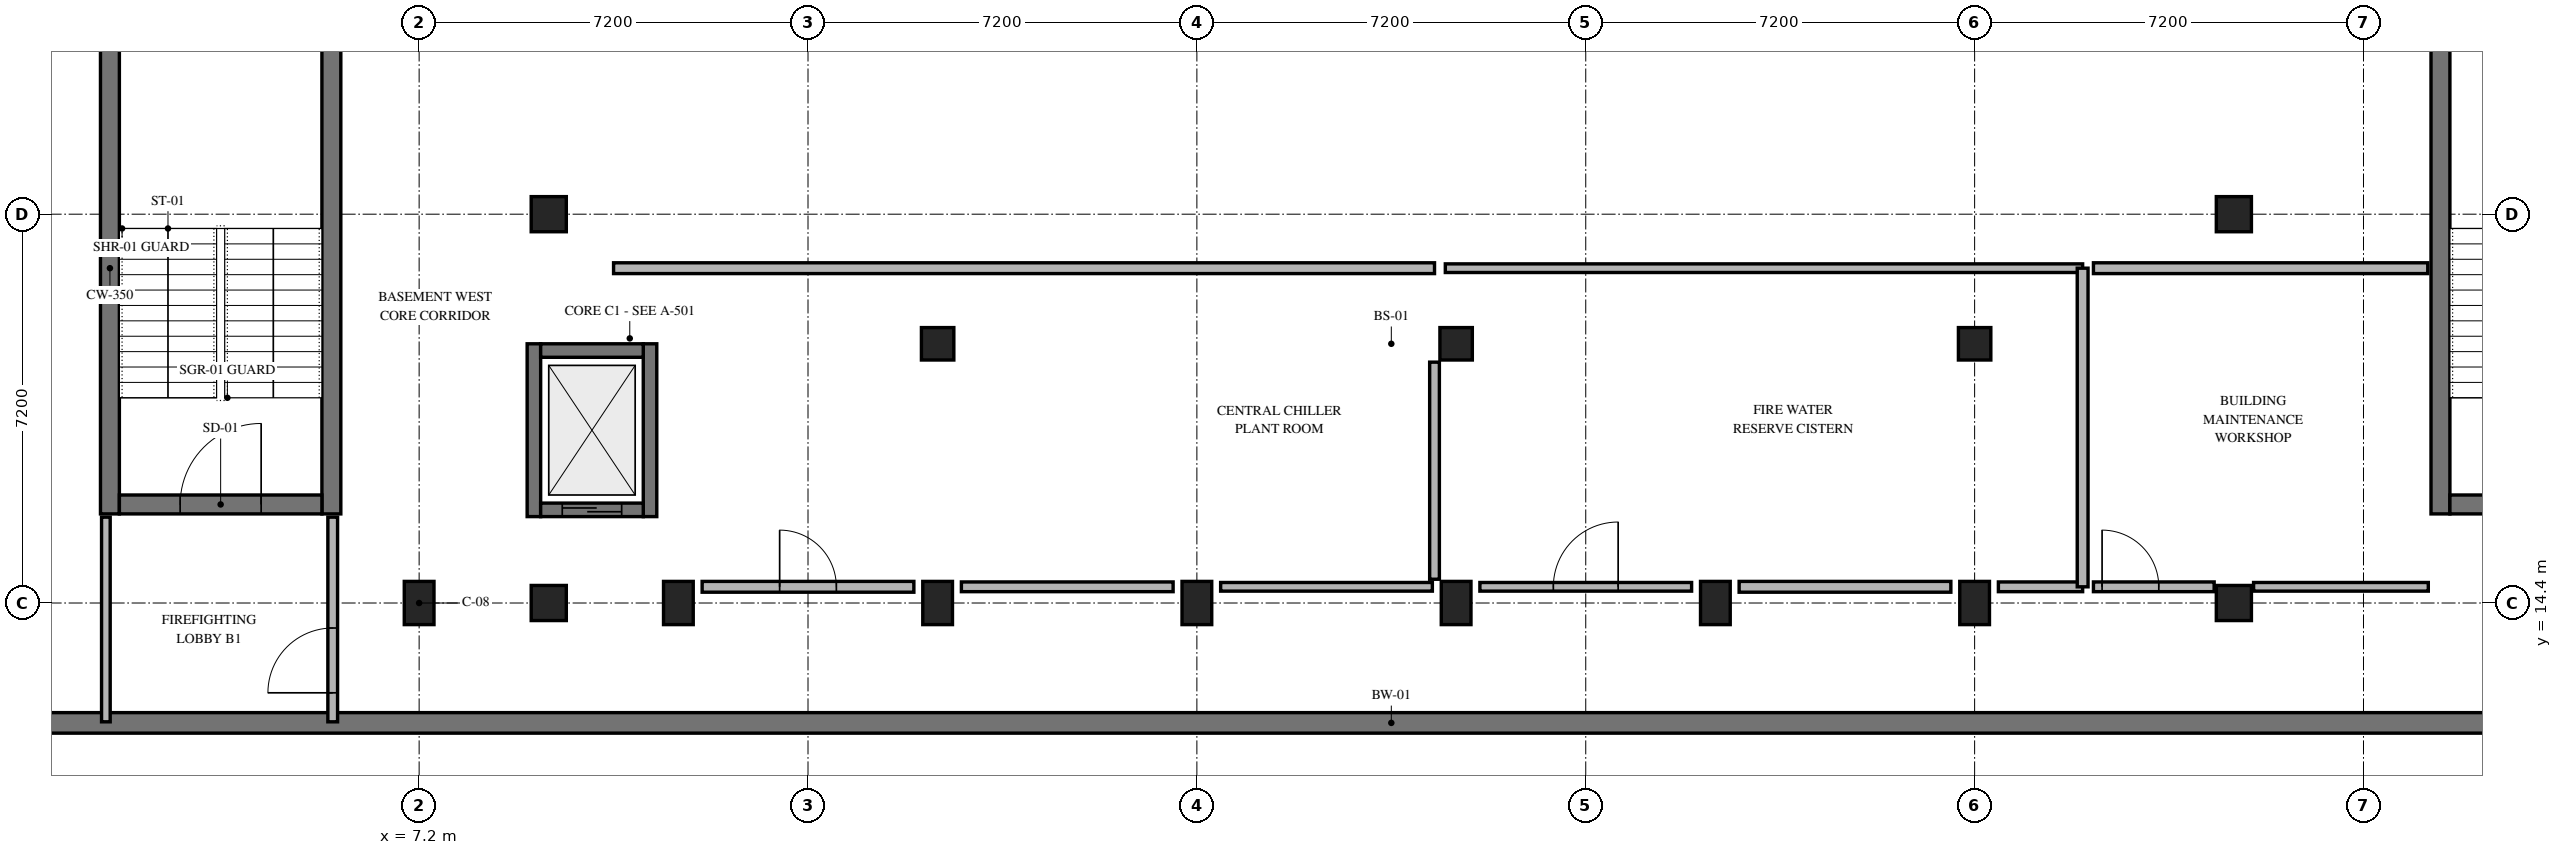
"""IFC4 building model, lengths in metres.
Left out: names, types, materials, properties, quantities, classifications, styles, units other than length and angle.
Written with IfcOpenShell. Run it as: python <this file> out.ifc"""

import sys

from ifc_helpers import new_model, si_unit, direction, frame, frame_2d, origin, origin_2d, place, context, subcontext, project, spatial, rectangle, extrude, element, fill, save


model = new_model("IFC4")
c1 = context("Model", 3, precision=1e-05, world=origin(), true_north=direction((0.0, 1.0)))
c2 = subcontext(c1, "Body", "Model", "MODEL_VIEW")
j1 = project(units=[si_unit("LENGTHUNIT", "METRE"), si_unit("PLANEANGLEUNIT", "RADIAN")], contexts=[c1])
p1 = place(None, origin())
s1 = spatial("IfcSite", under=j1, at=p1, CompositionType="ELEMENT")
p2 = place(p1, origin())
s2 = spatial("IfcBuilding", under=s1, at=p2, CompositionType="ELEMENT")
p3 = place(p2, frame((0.0, 0.0, -4.2)))
s3 = spatial("IfcBuildingStorey", under=s2, at=p3, CompositionType="ELEMENT", Elevation=-4.2)
for number, where, z_axis, x_axis in (
    (1, (9.6, 14.4, 0.0), (0.0, 0.0, 1.0), (1.0, 0.0, 0.0)),
    (2, (9.6, 21.6, 0.0), (0.0, 0.0, 1.0), (1.0, 0.0, 0.0)),
    (3, (40.8, 14.4, 0.0), (0.0, 0.0, 1.0), (1.0, 0.0, 0.0)),
    (4, (40.8, 21.6, 0.0), (0.0, 0.0, 1.0), (1.0, 0.0, 0.0)),
):
    element("IfcColumn", number, at=place(p3, frame(where, z_axis=z_axis, x_axis=x_axis)), inside=s3, PredefinedType="COLUMN", context=c2, shape_type="SweptSolid", body=[
        extrude(rectangle(XDim=0.65, YDim=0.65, at=origin_2d()), origin(), (0.0, 0.0, 1.0), 4.2),
    ])
for number, where, z_axis, x_axis in (
    (5, (7.2, 14.4, 0.0), (0.0, 0.0, 1.0), (1.0, 0.0, 0.0)),
    (6, (12.0, 14.4, 0.0), (0.0, 0.0, 1.0), (1.0, 0.0, 0.0)),
    (7, (16.8, 14.4, 0.0), (0.0, 0.0, 1.0), (1.0, 0.0, 0.0)),
    (8, (21.6, 14.4, 0.0), (0.0, 0.0, 1.0), (1.0, 0.0, 0.0)),
    (9, (26.4, 14.4, 0.0), (0.0, 0.0, 1.0), (1.0, 0.0, 0.0)),
    (10, (31.2, 14.4, 0.0), (0.0, 0.0, 1.0), (1.0, 0.0, 0.0)),
    (11, (36.0, 14.4, 0.0), (0.0, 0.0, 1.0), (1.0, 0.0, 0.0)),
):
    element("IfcColumn", number, at=place(p3, frame(where, z_axis=z_axis, x_axis=x_axis)), inside=s3, PredefinedType="COLUMN", context=c2, shape_type="SweptSolid", body=[
        extrude(rectangle(XDim=0.55, YDim=0.8, at=origin_2d()), origin(), (0.0, 0.0, 1.0), 4.2),
    ])
for number, where, z_axis, x_axis in (
    (12, (16.8, 19.2, 0.0), (0.0, 0.0, 1.0), (1.0, 0.0, 0.0)),
    (13, (26.4, 19.2, 0.0), (0.0, 0.0, 1.0), (1.0, 0.0, 0.0)),
    (14, (36.0, 19.2, 0.0), (0.0, 0.0, 1.0), (1.0, 0.0, 0.0)),
):
    element("IfcColumn", number, at=place(p3, frame(where, z_axis=z_axis, x_axis=x_axis)), inside=s3, PredefinedType="COLUMN", context=c2, shape_type="SweptSolid", body=[
        extrude(rectangle(XDim=0.6, YDim=0.6, at=origin_2d()), origin(), (0.0, 0.0, 1.0), 4.2),
    ])
p4 = place(p3, frame((50.59, 12.18, 0.0), z_axis=(0.0, 0.0, 1.0), x_axis=(-1.0, 0.0, 0.0)))
e15 = element("IfcWall", 15, at=p4, inside=s3, PredefinedType="SOLIDWALL", context=c2, shape_type="SweptSolid", body=[
    extrude(rectangle(XDim=50.78, YDim=0.38, at=frame_2d((25.39, 0.0))), origin(), (0.0, 0.0, 1.0), 3.92),
])
for number, where, z_axis, x_axis in (
    (16, (5.575, 16.05, 0.0), (0.0, 0.0, 1.0), (0.0, 1.0, 0.0)),
    (17, (1.475, 25.15, 0.0), (0.0, 0.0, 1.0), (0.0, -1.0, 0.0)),
):
    element("IfcWall", number, at=place(p3, frame(where, z_axis=z_axis, x_axis=x_axis)), inside=s3, PredefinedType="SHEAR", context=c2, shape_type="SweptSolid", body=[
        extrude(rectangle(XDim=9.1, YDim=0.35, at=frame_2d((4.55, 0.0))), origin(), (0.0, 0.0, 1.0), 3.92),
    ])
p5 = place(p3, frame((1.65, 16.225, 0.0), z_axis=(0.0, 0.0, 1.0), x_axis=(1.0, 0.0, 0.0)))
e18 = element("IfcWall", 18, at=p5, inside=s3, PredefinedType="SHEAR", context=c2, shape_type="SweptSolid", body=[
    extrude(rectangle(XDim=3.75, YDim=0.35, at=frame_2d((1.875, 0.0))), origin(), (0.0, 0.0, 1.0), 3.92),
])
p6 = place(p5, frame((1.125, 0.0, 0.0)))
e19 = element("IfcOpeningElement", 19, at=p6, cuts=e18, PredefinedType="OPENING", context=c2, shape_type="SweptSolid", body=[
    extrude(rectangle(XDim=1.5, YDim=2.2, at=frame_2d((0.75, 1.1))), frame((0.0, 0.185, 0.0), z_axis=(0.0, -1.0, 0.0), x_axis=(1.0, 0.0, 0.0)), (0.0, 0.0, 1.0), 0.37),
])
p7 = place(p3, frame((44.625, 25.15, 0.0), z_axis=(0.0, 0.0, 1.0), x_axis=(0.0, -1.0, 0.0)))
e20 = element("IfcWall", 20, at=p7, inside=s3, PredefinedType="SHEAR", context=c2, shape_type="SweptSolid", body=[
    extrude(rectangle(XDim=9.1, YDim=0.35, at=frame_2d((4.55, 0.0))), origin(), (0.0, 0.0, 1.0), 3.92),
])
p8 = place(p3, frame((44.8, 16.225, 0.0), z_axis=(0.0, 0.0, 1.0), x_axis=(1.0, 0.0, 0.0)))
e21 = element("IfcWall", 21, at=p8, inside=s3, PredefinedType="SHEAR", context=c2, shape_type="SweptSolid", body=[
    extrude(rectangle(XDim=3.75, YDim=0.35, at=frame_2d((1.875, 0.0))), origin(), (0.0, 0.0, 1.0), 3.92),
])
p9 = place(p8, frame((1.2, 0.0, 0.0)))
e22 = element("IfcOpeningElement", 22, at=p9, cuts=e21, PredefinedType="OPENING", context=c2, shape_type="SweptSolid", body=[
    extrude(rectangle(XDim=1.35, YDim=2.2, at=frame_2d((0.675, 1.1))), frame((0.0, 0.185, 0.0), z_axis=(0.0, -1.0, 0.0), x_axis=(1.0, 0.0, 0.0)), (0.0, 0.0, 1.0), 0.37),
])
for number, where, z_axis, x_axis in (
    (23, (9.325, 16.0, 0.0), (0.0, 0.0, 1.0), (0.0, 1.0, 0.0)),
    (24, (11.475, 19.2, 0.0), (0.0, 0.0, 1.0), (0.0, -1.0, 0.0)),
):
    element("IfcWall", number, at=place(p3, frame(where, z_axis=z_axis, x_axis=x_axis)), inside=s3, PredefinedType="SOLIDWALL", context=c2, shape_type="SweptSolid", body=[
        extrude(rectangle(XDim=3.2, YDim=0.25, at=frame_2d((1.6, 0.0))), origin(), (0.0, 0.0, 1.0), 3.92),
    ])
p10 = place(p3, frame((9.45, 16.125, 0.0), z_axis=(0.0, 0.0, 1.0), x_axis=(1.0, 0.0, 0.0)))
e25 = element("IfcWall", 25, at=p10, inside=s3, PredefinedType="SOLIDWALL", context=c2, shape_type="SweptSolid", body=[
    extrude(rectangle(XDim=1.9, YDim=0.25, at=frame_2d((0.95, 0.0))), origin(), (0.0, 0.0, 1.0), 3.92),
])
p11 = place(p10, frame((0.4, 0.0, 0.0)))
e26 = element("IfcOpeningElement", 26, at=p11, cuts=e25, PredefinedType="OPENING", context=c2, shape_type="SweptSolid", body=[
    extrude(rectangle(XDim=1.1, YDim=2.2, at=frame_2d((0.55, 1.1))), frame((0.0, 0.135, 0.0), z_axis=(0.0, -1.0, 0.0), x_axis=(1.0, 0.0, 0.0)), (0.0, 0.0, 1.0), 0.27),
])
p12 = place(p3, frame((11.35, 19.075, 0.0), z_axis=(0.0, 0.0, 1.0), x_axis=(-1.0, 0.0, 0.0)))
e27 = element("IfcWall", 27, at=p12, inside=s3, PredefinedType="SOLIDWALL", context=c2, shape_type="SweptSolid", body=[
    extrude(rectangle(XDim=1.9, YDim=0.25, at=frame_2d((0.95, 0.0))), origin(), (0.0, 0.0, 1.0), 3.92),
])
p13 = place(p3, frame((5.6, 12.2, 0.0), z_axis=(0.0, 0.0, 1.0), x_axis=(0.0, 1.0, 0.0)))
e28 = element("IfcWall", 28, at=p13, inside=s3, PredefinedType="PARTITIONING", context=c2, shape_type="SweptSolid", body=[
    extrude(rectangle(XDim=3.79, YDim=0.18, at=frame_2d((1.895, 0.0))), origin(), (0.0, 0.0, 1.0), 3.07),
])
p14 = place(p13, frame((0.537, 0.0, 0.0)))
e29 = element("IfcOpeningElement", 29, at=p14, cuts=e28, PredefinedType="OPENING", context=c2, shape_type="SweptSolid", body=[
    extrude(rectangle(XDim=1.2, YDim=2.2, at=frame_2d((0.6, 1.1))), frame((0.0, 0.1, 0.0), z_axis=(0.0, -1.0, 0.0), x_axis=(1.0, 0.0, 0.0)), (0.0, 0.0, 1.0), 0.2),
])
p15 = place(p3, frame((1.4, 15.99, 0.0), z_axis=(0.0, 0.0, 1.0), x_axis=(0.0, -1.0, 0.0)))
e30 = element("IfcWall", 30, at=p15, inside=s3, PredefinedType="PARTITIONING", context=c2, shape_type="SweptSolid", body=[
    extrude(rectangle(XDim=3.79, YDim=0.16, at=frame_2d((1.895, 0.0))), origin(), (0.0, 0.0, 1.0), 3.07),
])
p16 = place(p3, frame((12.44, 14.7, 0.0), z_axis=(0.0, 0.0, 1.0), x_axis=(1.0, 0.0, 0.0)))
e31 = element("IfcWall", 31, at=p16, inside=s3, PredefinedType="PARTITIONING", context=c2, shape_type="SweptSolid", body=[
    extrude(rectangle(XDim=3.92, YDim=0.2, at=frame_2d((1.96, 0.0))), origin(), (0.0, 0.0, 1.0), 3.02),
])
p17 = place(p16, frame((1.435, 0.0, 0.0)))
e32 = element("IfcOpeningElement", 32, at=p17, cuts=e31, PredefinedType="OPENING", context=c2, shape_type="SweptSolid", body=[
    extrude(rectangle(XDim=1.05, YDim=2.15, at=frame_2d((0.525, 1.075))), frame((0.0, 0.11, 0.0), z_axis=(0.0, -1.0, 0.0), x_axis=(1.0, 0.0, 0.0)), (0.0, 0.0, 1.0), 0.22),
])
p18 = place(p3, frame((17.24, 14.7, 0.0), z_axis=(0.0, 0.0, 1.0), x_axis=(1.0, 0.0, 0.0)))
e33 = element("IfcWall", 33, at=p18, inside=s3, PredefinedType="PARTITIONING", context=c2, shape_type="SweptSolid", body=[
    extrude(rectangle(XDim=3.92, YDim=0.18, at=frame_2d((1.96, 0.0))), origin(), (0.0, 0.0, 1.0), 3.07),
])
p19 = place(p3, frame((22.04, 14.7, 0.0), z_axis=(0.0, 0.0, 1.0), x_axis=(1.0, 0.0, 0.0)))
e34 = element("IfcWall", 34, at=p19, inside=s3, PredefinedType="PARTITIONING", context=c2, shape_type="SweptSolid", body=[
    extrude(rectangle(XDim=3.92, YDim=0.16, at=frame_2d((1.96, 0.0))), origin(), (0.0, 0.0, 1.0), 3.02),
])
p20 = place(p3, frame((26.0, 20.6, 0.0), z_axis=(0.0, 0.0, 1.0), x_axis=(-1.0, 0.0, 0.0)))
e35 = element("IfcWall", 35, at=p20, inside=s3, PredefinedType="PARTITIONING", context=c2, shape_type="SweptSolid", body=[
    extrude(rectangle(XDim=15.2, YDim=0.2, at=frame_2d((7.6, 0.0))), origin(), (0.0, 0.0, 1.0), 3.12),
])
p21 = place(p3, frame((26.0, 14.84, 0.0), z_axis=(0.0, 0.0, 1.0), x_axis=(0.0, 1.0, 0.0)))
e36 = element("IfcWall", 36, at=p21, inside=s3, PredefinedType="PARTITIONING", context=c2, shape_type="SweptSolid", body=[
    extrude(rectangle(XDim=4.02, YDim=0.18, at=frame_2d((2.01, 0.0))), origin(), (0.0, 0.0, 1.0), 3.42),
])
p22 = place(p3, frame((26.84, 14.7, 0.0), z_axis=(0.0, 0.0, 1.0), x_axis=(1.0, 0.0, 0.0)))
e37 = element("IfcWall", 37, at=p22, inside=s3, PredefinedType="PARTITIONING", context=c2, shape_type="SweptSolid", body=[
    extrude(rectangle(XDim=3.92, YDim=0.16, at=frame_2d((1.96, 0.0))), origin(), (0.0, 0.0, 1.0), 3.07),
])
p23 = place(p22, frame((1.36, 0.0, 0.0)))
e38 = element("IfcOpeningElement", 38, at=p23, cuts=e37, PredefinedType="OPENING", context=c2, shape_type="SweptSolid", body=[
    extrude(rectangle(XDim=1.2, YDim=2.2, at=frame_2d((0.6, 1.1))), frame((0.0, 0.09, 0.0), z_axis=(0.0, -1.0, 0.0), x_axis=(1.0, 0.0, 0.0)), (0.0, 0.0, 1.0), 0.18),
])
p24 = place(p3, frame((31.64, 14.7, 0.0), z_axis=(0.0, 0.0, 1.0), x_axis=(1.0, 0.0, 0.0)))
e39 = element("IfcWall", 39, at=p24, inside=s3, PredefinedType="PARTITIONING", context=c2, shape_type="SweptSolid", body=[
    extrude(rectangle(XDim=3.92, YDim=0.2, at=frame_2d((1.96, 0.0))), origin(), (0.0, 0.0, 1.0), 3.02),
])
p25 = place(p3, frame((36.44, 14.7, 0.0), z_axis=(0.0, 0.0, 1.0), x_axis=(1.0, 0.0, 0.0)))
e40 = element("IfcWall", 40, at=p25, inside=s3, PredefinedType="PARTITIONING", context=c2, shape_type="SweptSolid", body=[
    extrude(rectangle(XDim=1.56, YDim=0.18, at=frame_2d((0.78, 0.0))), origin(), (0.0, 0.0, 1.0), 3.07),
])
p26 = place(p3, frame((38.0, 20.6, 0.0), z_axis=(0.0, 0.0, 1.0), x_axis=(-1.0, 0.0, 0.0)))
e41 = element("IfcWall", 41, at=p26, inside=s3, PredefinedType="PARTITIONING", context=c2, shape_type="SweptSolid", body=[
    extrude(rectangle(XDim=11.8, YDim=0.16, at=frame_2d((5.9, 0.0))), origin(), (0.0, 0.0, 1.0), 3.02),
])
p27 = place(p3, frame((38.0, 14.7, 0.0), z_axis=(0.0, 0.0, 1.0), x_axis=(0.0, 1.0, 0.0)))
e42 = element("IfcWall", 42, at=p27, inside=s3, PredefinedType="PARTITIONING", context=c2, shape_type="SweptSolid", body=[
    extrude(rectangle(XDim=5.9, YDim=0.2, at=frame_2d((2.95, 0.0))), origin(), (0.0, 0.0, 1.0), 3.07),
])
p28 = place(p3, frame((38.2, 14.7, 0.0), z_axis=(0.0, 0.0, 1.0), x_axis=(1.0, 0.0, 0.0)))
e43 = element("IfcWall", 43, at=p28, inside=s3, PredefinedType="PARTITIONING", context=c2, shape_type="SweptSolid", body=[
    extrude(rectangle(XDim=2.235, YDim=0.18, at=frame_2d((1.118, 0.0))), origin(), (0.0, 0.0, 1.0), 3.07),
])
p29 = place(p28, frame((0.16, 0.0, 0.0)))
e44 = element("IfcOpeningElement", 44, at=p29, cuts=e43, PredefinedType="OPENING", context=c2, shape_type="SweptSolid", body=[
    extrude(rectangle(XDim=1.05, YDim=2.15, at=frame_2d((0.525, 1.075))), frame((0.0, 0.1, 0.0), z_axis=(0.0, -1.0, 0.0), x_axis=(1.0, 0.0, 0.0)), (0.0, 0.0, 1.0), 0.2),
])
p30 = place(p3, frame((41.165, 14.7, 0.0), z_axis=(0.0, 0.0, 1.0), x_axis=(1.0, 0.0, 0.0)))
e45 = element("IfcWall", 45, at=p30, inside=s3, PredefinedType="PARTITIONING", context=c2, shape_type="SweptSolid", body=[
    extrude(rectangle(XDim=3.235, YDim=0.16, at=frame_2d((1.617, 0.0))), origin(), (0.0, 0.0, 1.0), 3.02),
])
p31 = place(p3, frame((44.39, 20.6, 0.0), z_axis=(0.0, 0.0, 1.0), x_axis=(-1.0, 0.0, 0.0)))
e46 = element("IfcWall", 46, at=p31, inside=s3, PredefinedType="PARTITIONING", context=c2, shape_type="SweptSolid", body=[
    extrude(rectangle(XDim=6.19, YDim=0.2, at=frame_2d((3.095, 0.0))), origin(), (0.0, 0.0, 1.0), 3.02),
])
p32 = place(p6, origin())
e47 = element("IfcDoor", 47, at=p32, inside=s3, OperationType="SINGLE_SWING_RIGHT", PredefinedType="DOOR", context=c2, shape_type="SweptSolid", body=[
    extrude(rectangle(XDim=1.5, YDim=2.2, at=frame_2d((0.75, 1.1))), frame((0.0, 0.025, 0.0), z_axis=(0.0, -1.0, 0.0), x_axis=(1.0, 0.0, 0.0)), (0.0, 0.0, 1.0), 0.05),
])
fill(e19, e47)
p33 = place(p11, origin())
e48 = element("IfcDoor", 48, at=p33, inside=s3, OperationType="DOUBLE_DOOR_SLIDING", PredefinedType="DOOR", context=c2, shape_type="SweptSolid", body=[
    extrude(rectangle(XDim=1.1, YDim=2.2, at=frame_2d((0.55, 1.1))), frame((0.0, 0.025, 0.0), z_axis=(0.0, -1.0, 0.0), x_axis=(1.0, 0.0, 0.0)), (0.0, 0.0, 1.0), 0.05),
])
fill(e26, e48)
p34 = place(p14, origin())
e49 = element("IfcDoor", 49, at=p34, inside=s3, OperationType="SINGLE_SWING_LEFT", PredefinedType="DOOR", context=c2, shape_type="SweptSolid", body=[
    extrude(rectangle(XDim=1.2, YDim=2.2, at=frame_2d((0.6, 1.1))), frame((0.0, 0.025, 0.0), z_axis=(0.0, -1.0, 0.0), x_axis=(1.0, 0.0, 0.0)), (0.0, 0.0, 1.0), 0.05),
])
fill(e29, e49)
p35 = place(p17, origin())
e50 = element("IfcDoor", 50, at=p35, inside=s3, OperationType="SINGLE_SWING_LEFT", PredefinedType="DOOR", context=c2, shape_type="SweptSolid", body=[
    extrude(rectangle(XDim=1.05, YDim=2.15, at=frame_2d((0.525, 1.075))), frame((0.0, 0.025, 0.0), z_axis=(0.0, -1.0, 0.0), x_axis=(1.0, 0.0, 0.0)), (0.0, 0.0, 1.0), 0.05),
])
fill(e32, e50)
p36 = place(p23, origin())
e51 = element("IfcDoor", 51, at=p36, inside=s3, OperationType="SINGLE_SWING_RIGHT", PredefinedType="DOOR", context=c2, shape_type="SweptSolid", body=[
    extrude(rectangle(XDim=1.2, YDim=2.2, at=frame_2d((0.6, 1.1))), frame((0.0, 0.025, 0.0), z_axis=(0.0, -1.0, 0.0), x_axis=(1.0, 0.0, 0.0)), (0.0, 0.0, 1.0), 0.05),
])
fill(e38, e51)
p37 = place(p29, origin())
e52 = element("IfcDoor", 52, at=p37, inside=s3, OperationType="SINGLE_SWING_LEFT", PredefinedType="DOOR", context=c2, shape_type="SweptSolid", body=[
    extrude(rectangle(XDim=1.05, YDim=2.15, at=frame_2d((0.525, 1.075))), frame((0.0, 0.025, 0.0), z_axis=(0.0, -1.0, 0.0), x_axis=(1.0, 0.0, 0.0)), (0.0, 0.0, 1.0), 0.05),
])
fill(e44, e52)
save(model, sys.argv[1])
